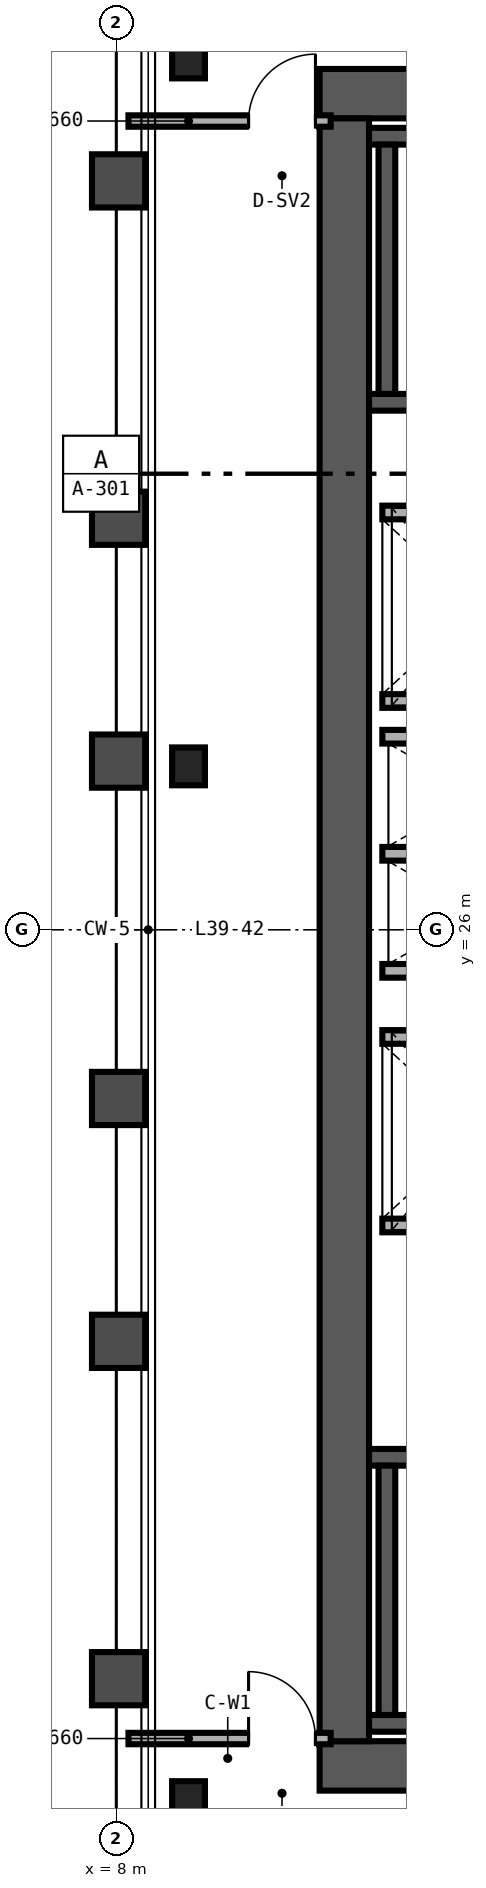
"""IFC4 building model, lengths in metres.
Left out: names, types, materials, properties, quantities, classifications, styles, units other than length and angle.
Written with IfcOpenShell. Run it as: python <this file> out.ifc"""

import sys

from ifc_helpers import new_model, si_unit, direction, frame, frame_2d, origin, origin_2d, place, context, subcontext, project, spatial, rectangle, i_section, extrude, source, transform, mapped, element, fill, save


model = new_model("IFC4")
c1 = context("Model", 3, precision=1e-05, world=origin(), true_north=direction((0.0, 1.0)))
c2 = subcontext(c1, "Body", "Model", "MODEL_VIEW")
j1 = project(units=[si_unit("LENGTHUNIT", "METRE"), si_unit("PLANEANGLEUNIT", "RADIAN")], contexts=[c1])
p1 = place(None, origin())
s1 = spatial("IfcSite", under=j1, at=p1, CompositionType="ELEMENT")
p2 = place(p1, origin())
s2 = spatial("IfcBuilding", under=s1, at=p2, CompositionType="ELEMENT")
p3 = place(p2, frame((0.0, 0.0, 158.4)))
s3 = spatial("IfcBuildingStorey", under=s2, at=p3, CompositionType="ELEMENT", Elevation=158.4)
p4 = place(p3, frame((10.675, 15.0, 0.0), z_axis=(0.0, 0.0, 1.0), x_axis=(1.0, 0.0, 0.0)))
e1 = element("IfcWall", 1, at=p4, inside=s3, PredefinedType="SHEAR", context=c2, shape_type="SweptSolid", body=[
    extrude(rectangle(XDim=12.65, YDim=0.65, at=frame_2d((6.325, 0.0))), origin(), (0.0, 0.0, 1.0), 4.57),
])
p5 = place(p4, frame((10.225, 0.0, 0.0)))
e2 = element("IfcOpeningElement", 2, at=p5, cuts=e1, PredefinedType="OPENING", context=c2, shape_type="SweptSolid", body=[
    extrude(rectangle(XDim=1.0, YDim=2.15, at=frame_2d((0.5, 1.075))), frame((0.0, 0.335, 0.0), z_axis=(0.0, -1.0, 0.0), x_axis=(1.0, 0.0, 0.0)), (0.0, 0.0, 1.0), 0.67),
])
p6 = place(p3, frame((10.675, 37.0, 0.0), z_axis=(0.0, 0.0, 1.0), x_axis=(1.0, 0.0, 0.0)))
e3 = element("IfcWall", 3, at=p6, inside=s3, PredefinedType="SHEAR", context=c2, shape_type="SweptSolid", body=[
    extrude(rectangle(XDim=12.65, YDim=0.65, at=frame_2d((6.325, 0.0))), origin(), (0.0, 0.0, 1.0), 4.57),
])
p7 = place(p6, frame((8.905, 0.0, 0.0)))
e4 = element("IfcOpeningElement", 4, at=p7, cuts=e3, PredefinedType="OPENING", context=c2, shape_type="SweptSolid", body=[
    extrude(rectangle(XDim=1.0, YDim=2.15, at=frame_2d((0.5, 1.075))), frame((0.0, 0.335, 0.0), z_axis=(0.0, -1.0, 0.0), x_axis=(1.0, 0.0, 0.0)), (0.0, 0.0, 1.0), 0.67),
])
p8 = place(p3, frame((11.0, 15.325, 0.0), z_axis=(0.0, 0.0, 1.0), x_axis=(0.0, 1.0, 0.0)))
e5 = element("IfcWall", 5, at=p8, inside=s3, PredefinedType="SHEAR", context=c2, shape_type="SweptSolid", body=[
    extrude(rectangle(XDim=21.35, YDim=0.65, at=frame_2d((10.675, 0.0))), origin(), (0.0, 0.0, 1.0), 4.57),
])
p9 = place(p3, frame((11.325, 15.56, 0.0), z_axis=(0.0, 0.0, 1.0), x_axis=(1.0, 0.0, 0.0)))
e6 = element("IfcWall", 6, at=p9, inside=s3, PredefinedType="SHEAR", context=c2, shape_type="SweptSolid", body=[
    extrude(rectangle(XDim=7.985, YDim=0.22, at=frame_2d((3.993, 0.0))), origin(), (0.0, 0.0, 1.0), 4.6),
])
p10 = place(p3, frame((11.325, 19.06, 0.0), z_axis=(0.0, 0.0, 1.0), x_axis=(1.0, 0.0, 0.0)))
e7 = element("IfcWall", 7, at=p10, inside=s3, PredefinedType="SHEAR", context=c2, shape_type="SweptSolid", body=[
    extrude(rectangle(XDim=7.985, YDim=0.22, at=frame_2d((3.993, 0.0))), origin(), (0.0, 0.0, 1.0), 4.6),
])
p11 = place(p10, frame((0.595, 0.0, 0.0)))
e8 = element("IfcOpeningElement", 8, at=p11, cuts=e7, PredefinedType="OPENING", context=c2, shape_type="SweptSolid", body=[
    extrude(rectangle(XDim=1.05, YDim=2.15, at=frame_2d((0.525, 1.075))), frame((0.0, 0.12, 0.0), z_axis=(0.0, -1.0, 0.0), x_axis=(1.0, 0.0, 0.0)), (0.0, 0.0, 1.0), 0.24),
])
p12 = place(p3, frame((11.56, 15.67, 0.0), z_axis=(0.0, 0.0, 1.0), x_axis=(0.0, 1.0, 0.0)))
e9 = element("IfcWall", 9, at=p12, inside=s3, PredefinedType="SHEAR", context=c2, shape_type="SweptSolid", body=[
    extrude(rectangle(XDim=3.28, YDim=0.22, at=frame_2d((1.64, 0.0))), origin(), (0.0, 0.0, 1.0), 4.6),
])
p13 = place(p3, frame((11.325, 32.94, 0.0), z_axis=(0.0, 0.0, 1.0), x_axis=(1.0, 0.0, 0.0)))
e10 = element("IfcWall", 10, at=p13, inside=s3, PredefinedType="SHEAR", context=c2, shape_type="SweptSolid", body=[
    extrude(rectangle(XDim=7.985, YDim=0.22, at=frame_2d((3.993, 0.0))), origin(), (0.0, 0.0, 1.0), 4.6),
])
p14 = place(p13, frame((0.595, 0.0, 0.0)))
e11 = element("IfcOpeningElement", 11, at=p14, cuts=e10, PredefinedType="OPENING", context=c2, shape_type="SweptSolid", body=[
    extrude(rectangle(XDim=1.05, YDim=2.15, at=frame_2d((0.525, 1.075))), frame((0.0, 0.12, 0.0), z_axis=(0.0, -1.0, 0.0), x_axis=(1.0, 0.0, 0.0)), (0.0, 0.0, 1.0), 0.24),
])
p15 = place(p3, frame((11.325, 36.44, 0.0), z_axis=(0.0, 0.0, 1.0), x_axis=(1.0, 0.0, 0.0)))
e12 = element("IfcWall", 12, at=p15, inside=s3, PredefinedType="SHEAR", context=c2, shape_type="SweptSolid", body=[
    extrude(rectangle(XDim=7.985, YDim=0.22, at=frame_2d((3.993, 0.0))), origin(), (0.0, 0.0, 1.0), 4.6),
])
p16 = place(p3, frame((11.56, 33.05, 0.0), z_axis=(0.0, 0.0, 1.0), x_axis=(0.0, 1.0, 0.0)))
e13 = element("IfcWall", 13, at=p16, inside=s3, PredefinedType="SHEAR", context=c2, shape_type="SweptSolid", body=[
    extrude(rectangle(XDim=3.28, YDim=0.22, at=frame_2d((1.64, 0.0))), origin(), (0.0, 0.0, 1.0), 4.6),
])
m1 = source(origin(), c2, "Body", "SweptSolid", [
    extrude(i_section(OverallWidth=0.432, OverallDepth=0.498, WebThickness=0.056, FlangeThickness=0.089, FilletRadius=0.025, at=origin_2d()), origin(), (0.0, 0.0, 1.0), 4.57),
])
for number, where, z_axis, x_axis in (
    (14, (8.95, 14.55, 0.0), (0.0, 0.0, 1.0), (1.0, 0.0, 0.0)),
    (15, (8.95, 28.15, 0.0), (0.0, 0.0, 1.0), (1.0, 0.0, 0.0)),
    (16, (8.95, 37.45, 0.0), (0.0, 0.0, 1.0), (1.0, 0.0, 0.0)),
):
    element("IfcColumn", number, at=place(p3, frame(where, z_axis=z_axis, x_axis=x_axis)), inside=s3, PredefinedType="COLUMN", context=c2, shape_type="MappedRepresentation", body=[
        mapped(m1, transform((0.0, 0.0, 0.0), scale=1.0)),
    ])
for number, where, z_axis, x_axis in (
    (17, (11.5, 22.11, 0.0), (0.0, 0.0, 1.0), (1.0, 0.0, 0.0)),
    (18, (11.5, 24.59, 0.0), (0.0, 0.0, 1.0), (1.0, 0.0, 0.0)),
    (19, (11.5, 29.01, 0.0), (0.0, 0.0, 1.0), (1.0, 0.0, 0.0)),
    (20, (11.5, 31.49, 0.0), (0.0, 0.0, 1.0), (1.0, 0.0, 0.0)),
):
    element("IfcWall", number, at=place(p3, frame(where, z_axis=z_axis, x_axis=x_axis)), inside=s3, PredefinedType="SOLIDWALL", context=c2, shape_type="SweptSolid", body=[
        extrude(rectangle(XDim=2.5, YDim=0.18, at=frame_2d((1.25, 0.0))), origin(), (0.0, 0.0, 1.0), 4.57),
    ])
for number, where, z_axis, x_axis in (
    (21, (11.5, 25.46, 0.0), (0.0, 0.0, 1.0), (1.0, 0.0, 0.0)),
    (22, (11.5, 27.0, 0.0), (0.0, 0.0, 1.0), (1.0, 0.0, 0.0)),
    (23, (11.5, 28.54, 0.0), (0.0, 0.0, 1.0), (1.0, 0.0, 0.0)),
):
    element("IfcWall", number, at=place(p3, frame(where, z_axis=z_axis, x_axis=x_axis)), inside=s3, PredefinedType="SOLIDWALL", context=c2, shape_type="SweptSolid", body=[
        extrude(rectangle(XDim=2.51, YDim=0.18, at=frame_2d((1.255, 0.0))), origin(), (0.0, 0.0, 1.0), 4.57),
    ])
p17 = place(p3, frame((8.16, 15.36, 0.0), z_axis=(0.0, 0.0, 1.0), x_axis=(1.0, 0.0, 0.0)))
e24 = element("IfcWall", 24, at=p17, inside=s3, PredefinedType="PARTITIONING", context=c2, shape_type="SweptSolid", body=[
    extrude(rectangle(XDim=2.66, YDim=0.15, at=frame_2d((1.33, 0.0))), origin(), (0.0, 0.0, 1.0), 3.791),
])
p18 = place(p17, frame((1.58, 0.0, 0.0)))
e25 = element("IfcOpeningElement", 25, at=p18, cuts=e24, PredefinedType="OPENING", context=c2, shape_type="SweptSolid", body=[
    extrude(rectangle(XDim=0.88, YDim=2.15, at=frame_2d((0.44, 1.075))), frame((0.0, 0.085, 0.0), z_axis=(0.0, -1.0, 0.0), x_axis=(1.0, 0.0, 0.0)), (0.0, 0.0, 1.0), 0.17),
])
p19 = place(p3, frame((8.16, 36.64, 0.0), z_axis=(0.0, 0.0, 1.0), x_axis=(1.0, 0.0, 0.0)))
e26 = element("IfcWall", 26, at=p19, inside=s3, PredefinedType="PARTITIONING", context=c2, shape_type="SweptSolid", body=[
    extrude(rectangle(XDim=2.66, YDim=0.15, at=frame_2d((1.33, 0.0))), origin(), (0.0, 0.0, 1.0), 3.953),
])
p20 = place(p19, frame((1.58, 0.0, 0.0)))
e27 = element("IfcOpeningElement", 27, at=p20, cuts=e26, PredefinedType="OPENING", context=c2, shape_type="SweptSolid", body=[
    extrude(rectangle(XDim=0.88, YDim=2.15, at=frame_2d((0.44, 1.075))), frame((0.0, 0.085, 0.0), z_axis=(0.0, -1.0, 0.0), x_axis=(1.0, 0.0, 0.0)), (0.0, 0.0, 1.0), 0.17),
])
m2 = source(origin(), c2, "Body", "SweptSolid", [
    extrude(rectangle(XDim=0.88, YDim=2.15, at=frame_2d((0.44, 1.075))), frame((0.0, 0.025, 0.0), z_axis=(0.0, -1.0, 0.0), x_axis=(1.0, 0.0, 0.0)), (0.0, 0.0, 1.0), 0.05),
])
p21 = place(p18, origin())
e28 = element("IfcDoor", 28, at=p21, inside=s3, OperationType="SINGLE_SWING_LEFT", PredefinedType="DOOR", context=c2, shape_type="MappedRepresentation", body=[
    mapped(m2, transform((0.0, 0.0, 0.0), scale=1.0)),
])
fill(e25, e28)
p22 = place(p20, origin())
e29 = element("IfcDoor", 29, at=p22, inside=s3, OperationType="SINGLE_SWING_RIGHT", PredefinedType="DOOR", context=c2, shape_type="MappedRepresentation", body=[
    mapped(m2, transform((0.0, 0.0, 0.0), scale=1.0)),
])
fill(e27, e29)
save(model, sys.argv[1])
